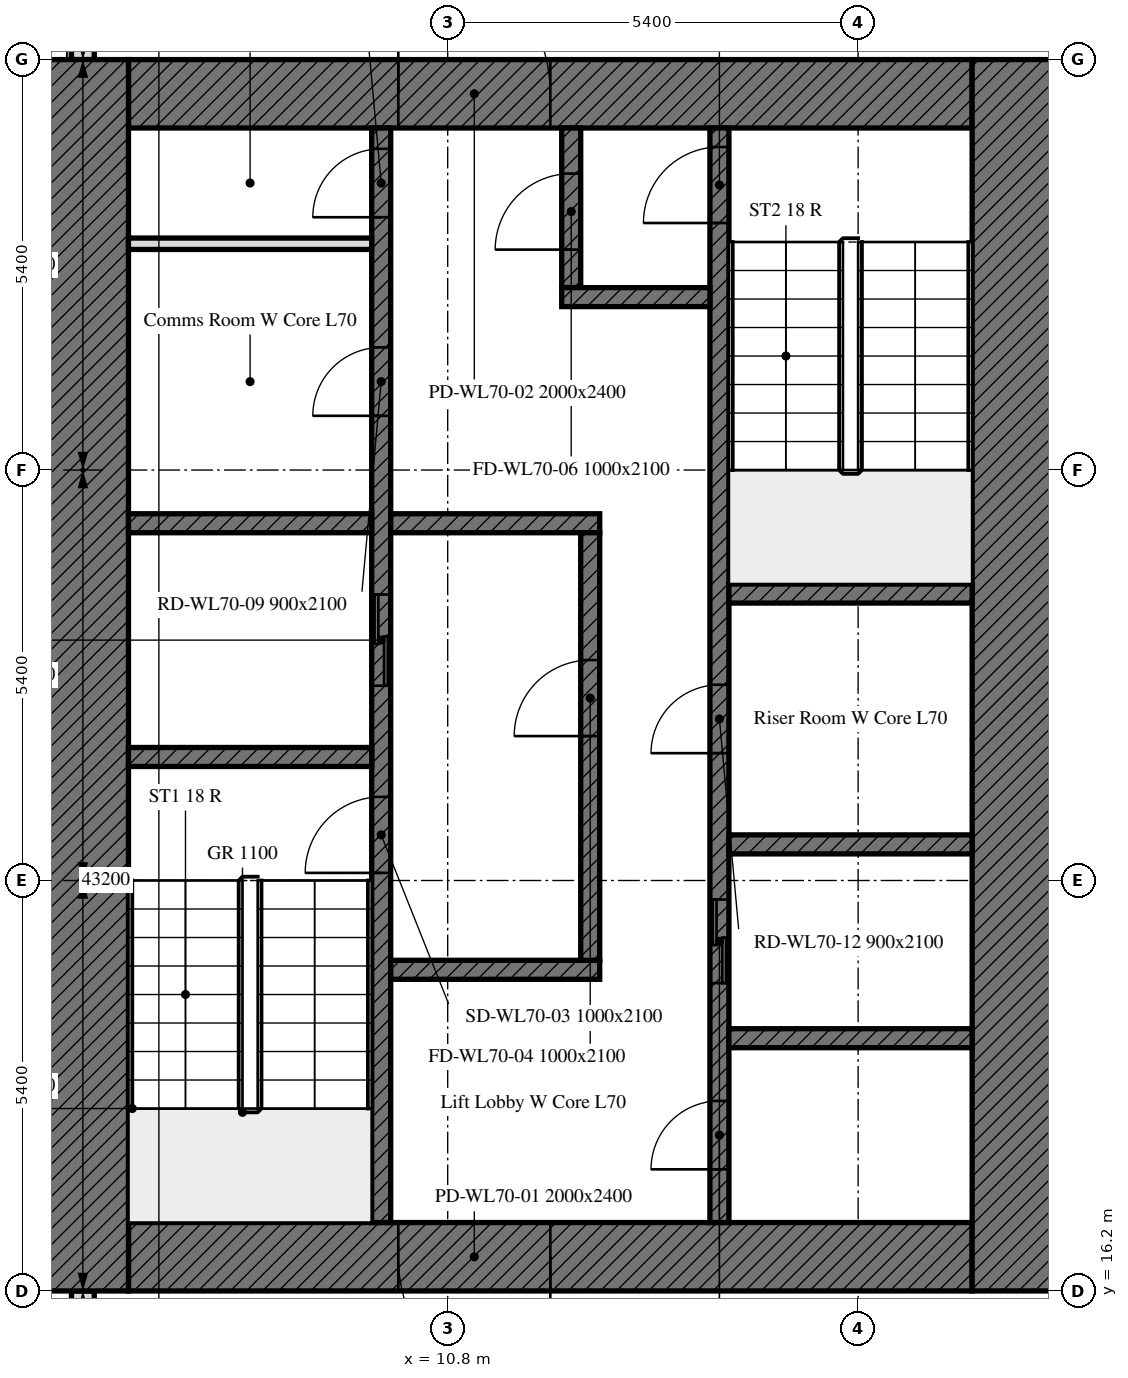
"""IFC4 building model, lengths in metres.
Left out: names, types, materials, properties, quantities, classifications, styles, units other than length and angle.
Written with IfcOpenShell. Run it as: python <this file> out.ifc"""

import sys

from ifc_helpers import new_model, si_unit, direction, frame, frame_2d, origin, place, context, subcontext, project, spatial, rectangle, extrude, element, fill, save


model = new_model("IFC4")
c1 = context("Model", 3, precision=1e-05, world=origin(), true_north=direction((0.0, 1.0)))
c2 = subcontext(c1, "Body", "Model", "MODEL_VIEW")
j1 = project(units=[si_unit("LENGTHUNIT", "METRE"), si_unit("PLANEANGLEUNIT", "RADIAN")], contexts=[c1])
p1 = place(None, origin())
s1 = spatial("IfcSite", under=j1, at=p1, CompositionType="ELEMENT")
p2 = place(p1, origin())
s2 = spatial("IfcBuilding", under=s1, at=p2, CompositionType="ELEMENT")
p3 = place(p2, frame((0.0, 0.0, 285.1)))
s3 = spatial("IfcBuildingStorey", under=s2, at=p3, CompositionType="ELEMENT", Elevation=285.1)
p4 = place(p3, frame((6.0, 37.614, 0.0), z_axis=(0.0, 0.0, 1.0), x_axis=(0.0, -1.0, 0.0)))
e1 = element("IfcWall", 1, at=p4, inside=s3, PredefinedType="SOLIDWALL", context=c2, shape_type="SweptSolid", body=[
    extrude(rectangle(XDim=5.214, YDim=0.3, at=frame_2d((2.607, 0.0))), origin(), (0.0, 0.0, 1.0), 3.0),
])
p5 = place(p4, frame((1.164, 0.0, 0.9)))
e2 = element("IfcOpeningElement", 2, at=p5, cuts=e1, PredefinedType="OPENING", context=c2, shape_type="SweptSolid", body=[
    extrude(rectangle(XDim=1.1, YDim=1.7, at=frame_2d((0.55, 0.85))), frame((0.0, 0.16, 0.0), z_axis=(0.0, -1.0, 0.0), x_axis=(1.0, 0.0, 0.0)), (0.0, 0.0, 1.0), 0.32),
])
p6 = place(p4, frame((3.139, 0.0, 0.9)))
e3 = element("IfcOpeningElement", 3, at=p6, cuts=e1, PredefinedType="OPENING", context=c2, shape_type="SweptSolid", body=[
    extrude(rectangle(XDim=0.65, YDim=1.7, at=frame_2d((0.325, 0.85))), frame((0.0, 0.16, 0.0), z_axis=(0.0, -1.0, 0.0), x_axis=(1.0, 0.0, 0.0)), (0.0, 0.0, 1.0), 0.32),
])
p7 = place(p3, frame((6.0, 16.2, 0.0), z_axis=(0.0, 0.0, 1.0), x_axis=(0.0, -1.0, 0.0)))
e4 = element("IfcWall", 4, at=p7, inside=s3, PredefinedType="SOLIDWALL", context=c2, shape_type="SweptSolid", body=[
    extrude(rectangle(XDim=10.614, YDim=0.3, at=frame_2d((5.307, 0.0))), origin(), (0.0, 0.0, 1.0), 3.0),
])
p8 = place(p7, frame((1.0, 0.0, 0.9)))
e5 = element("IfcOpeningElement", 5, at=p8, cuts=e4, PredefinedType="OPENING", context=c2, shape_type="SweptSolid", body=[
    extrude(rectangle(XDim=1.1, YDim=1.7, at=frame_2d((0.55, 0.85))), frame((0.0, 0.16, 0.0), z_axis=(0.0, -1.0, 0.0), x_axis=(1.0, 0.0, 0.0)), (0.0, 0.0, 1.0), 0.32),
])
p9 = place(p7, frame((2.95, 0.0, 0.9)))
e6 = element("IfcOpeningElement", 6, at=p9, cuts=e4, PredefinedType="OPENING", context=c2, shape_type="SweptSolid", body=[
    extrude(rectangle(XDim=1.1, YDim=1.7, at=frame_2d((0.55, 0.85))), frame((0.0, 0.16, 0.0), z_axis=(0.0, -1.0, 0.0), x_axis=(1.0, 0.0, 0.0)), (0.0, 0.0, 1.0), 0.32),
])
p10 = place(p7, frame((6.75, 0.0, 0.9)))
e7 = element("IfcOpeningElement", 7, at=p10, cuts=e4, PredefinedType="OPENING", context=c2, shape_type="SweptSolid", body=[
    extrude(rectangle(XDim=1.1, YDim=1.7, at=frame_2d((0.55, 0.85))), frame((0.0, 0.16, 0.0), z_axis=(0.0, -1.0, 0.0), x_axis=(1.0, 0.0, 0.0)), (0.0, 0.0, 1.0), 0.32),
])
p11 = place(p7, frame((8.35, 0.0, 0.9)))
e8 = element("IfcOpeningElement", 8, at=p11, cuts=e4, PredefinedType="OPENING", context=c2, shape_type="SweptSolid", body=[
    extrude(rectangle(XDim=1.1, YDim=1.7, at=frame_2d((0.55, 0.85))), frame((0.0, 0.16, 0.0), z_axis=(0.0, -1.0, 0.0), x_axis=(1.0, 0.0, 0.0)), (0.0, 0.0, 1.0), 0.32),
])
p12 = place(p3, frame((17.7, 16.65, 0.0), z_axis=(0.0, 0.0, 1.0), x_axis=(-1.0, 0.0, 0.0)))
e9 = element("IfcWall", 9, at=p12, inside=s3, PredefinedType="SOLIDWALL", context=c2, shape_type="SweptSolid", body=[
    extrude(rectangle(XDim=11.1, YDim=0.9, at=frame_2d((5.55, 0.0))), origin(), (0.0, 0.0, 1.0), 3.0),
])
p13 = place(p12, frame((5.55, 0.0, 0.0)))
e10 = element("IfcOpeningElement", 10, at=p13, cuts=e9, PredefinedType="OPENING", context=c2, shape_type="SweptSolid", body=[
    extrude(rectangle(XDim=2.0, YDim=2.4, at=frame_2d((1.0, 1.2))), frame((0.0, 0.45, 0.0), z_axis=(0.0, -1.0, 0.0), x_axis=(1.0, 0.0, 0.0)), (0.0, 0.0, 1.0), 0.9),
])
p14 = place(p3, frame((6.6, 31.95, 0.0), z_axis=(0.0, 0.0, 1.0), x_axis=(1.0, 0.0, 0.0)))
e11 = element("IfcWall", 11, at=p14, inside=s3, PredefinedType="SOLIDWALL", context=c2, shape_type="SweptSolid", body=[
    extrude(rectangle(XDim=11.1, YDim=0.9, at=frame_2d((5.55, 0.0))), origin(), (0.0, 0.0, 1.0), 3.0),
])
p15 = place(p14, frame((3.55, 0.0, 0.0)))
e12 = element("IfcOpeningElement", 12, at=p15, cuts=e11, PredefinedType="OPENING", context=c2, shape_type="SweptSolid", body=[
    extrude(rectangle(XDim=2.0, YDim=2.4, at=frame_2d((1.0, 1.2))), frame((0.0, 0.45, 0.0), z_axis=(0.0, -1.0, 0.0), x_axis=(1.0, 0.0, 0.0)), (0.0, 0.0, 1.0), 0.9),
])
for number, where, z_axis, x_axis in (
    (13, (6.0, 16.2, 0.0), (0.0, 0.0, 1.0), (0.0, 1.0, 0.0)),
    (14, (18.3, 32.4, 0.0), (0.0, 0.0, 1.0), (0.0, -1.0, 0.0)),
):
    element("IfcWall", number, at=place(p3, frame(where, z_axis=z_axis, x_axis=x_axis)), inside=s3, PredefinedType="SOLIDWALL", context=c2, shape_type="SweptSolid", body=[
        extrude(rectangle(XDim=16.2, YDim=1.2, at=frame_2d((8.1, 0.0))), origin(), (0.0, 0.0, 1.0), 3.0),
    ])
p16 = place(p3, frame((9.925, 17.1, 0.0), z_axis=(0.0, 0.0, 1.0), x_axis=(0.0, 1.0, 0.0)))
e15 = element("IfcWall", 15, at=p16, inside=s3, PredefinedType="SOLIDWALL", context=c2, shape_type="SweptSolid", body=[
    extrude(rectangle(XDim=14.4, YDim=0.25, at=frame_2d((7.2, 0.0))), origin(), (0.0, 0.0, 1.0), 3.0),
])
p17 = place(p16, frame((4.6, 0.0, 0.0)))
e16 = element("IfcOpeningElement", 16, at=p17, cuts=e15, PredefinedType="OPENING", context=c2, shape_type="SweptSolid", body=[
    extrude(rectangle(XDim=1.0, YDim=2.1, at=frame_2d((0.5, 1.05))), frame((0.0, 0.125, 0.0), z_axis=(0.0, -1.0, 0.0), x_axis=(1.0, 0.0, 0.0)), (0.0, 0.0, 1.0), 0.25),
])
p18 = place(p16, frame((7.062, 0.0, 0.0)))
e17 = element("IfcOpeningElement", 17, at=p18, cuts=e15, PredefinedType="OPENING", context=c2, shape_type="SweptSolid", body=[
    extrude(rectangle(XDim=1.2, YDim=2.1, at=frame_2d((0.6, 1.05))), frame((0.0, 0.125, 0.0), z_axis=(0.0, -1.0, 0.0), x_axis=(1.0, 0.0, 0.0)), (0.0, 0.0, 1.0), 0.25),
])
p19 = place(p16, frame((10.614, 0.0, 0.0)))
e18 = element("IfcOpeningElement", 18, at=p19, cuts=e15, PredefinedType="OPENING", context=c2, shape_type="SweptSolid", body=[
    extrude(rectangle(XDim=0.9, YDim=2.1, at=frame_2d((0.45, 1.05))), frame((0.0, 0.125, 0.0), z_axis=(0.0, -1.0, 0.0), x_axis=(1.0, 0.0, 0.0)), (0.0, 0.0, 1.0), 0.25),
])
p20 = place(p16, frame((13.226, 0.0, 0.0)))
e19 = element("IfcOpeningElement", 19, at=p20, cuts=e15, PredefinedType="OPENING", context=c2, shape_type="SweptSolid", body=[
    extrude(rectangle(XDim=0.9, YDim=2.1, at=frame_2d((0.45, 1.05))), frame((0.0, 0.125, 0.0), z_axis=(0.0, -1.0, 0.0), x_axis=(1.0, 0.0, 0.0)), (0.0, 0.0, 1.0), 0.25),
])
p21 = place(p3, frame((14.375, 17.1, 0.0), z_axis=(0.0, 0.0, 1.0), x_axis=(0.0, 1.0, 0.0)))
e20 = element("IfcWall", 20, at=p21, inside=s3, PredefinedType="SOLIDWALL", context=c2, shape_type="SweptSolid", body=[
    extrude(rectangle(XDim=14.4, YDim=0.25, at=frame_2d((7.2, 0.0))), origin(), (0.0, 0.0, 1.0), 3.0),
])
p22 = place(p21, frame((13.15, 0.0, 0.0)))
e21 = element("IfcOpeningElement", 21, at=p22, cuts=e20, PredefinedType="OPENING", context=c2, shape_type="SweptSolid", body=[
    extrude(rectangle(XDim=1.0, YDim=2.1, at=frame_2d((0.5, 1.05))), frame((0.0, 0.125, 0.0), z_axis=(0.0, -1.0, 0.0), x_axis=(1.0, 0.0, 0.0)), (0.0, 0.0, 1.0), 0.25),
])
p23 = place(p21, frame((3.15, 0.0, 0.0)))
e22 = element("IfcOpeningElement", 22, at=p23, cuts=e20, PredefinedType="OPENING", context=c2, shape_type="SweptSolid", body=[
    extrude(rectangle(XDim=1.1, YDim=2.1, at=frame_2d((0.55, 1.05))), frame((0.0, 0.125, 0.0), z_axis=(0.0, -1.0, 0.0), x_axis=(1.0, 0.0, 0.0)), (0.0, 0.0, 1.0), 0.25),
])
p24 = place(p21, frame((0.7, 0.0, 0.0)))
e23 = element("IfcOpeningElement", 23, at=p24, cuts=e20, PredefinedType="OPENING", context=c2, shape_type="SweptSolid", body=[
    extrude(rectangle(XDim=0.9, YDim=2.1, at=frame_2d((0.45, 1.05))), frame((0.0, 0.125, 0.0), z_axis=(0.0, -1.0, 0.0), x_axis=(1.0, 0.0, 0.0)), (0.0, 0.0, 1.0), 0.25),
])
p25 = place(p21, frame((6.175, 0.0, 0.0)))
e24 = element("IfcOpeningElement", 24, at=p25, cuts=e20, PredefinedType="OPENING", context=c2, shape_type="SweptSolid", body=[
    extrude(rectangle(XDim=0.9, YDim=2.1, at=frame_2d((0.45, 1.05))), frame((0.0, 0.125, 0.0), z_axis=(0.0, -1.0, 0.0), x_axis=(1.0, 0.0, 0.0)), (0.0, 0.0, 1.0), 0.25),
])
for number, where, z_axis, x_axis in (
    (25, (6.6, 23.225, 0.0), (0.0, 0.0, 1.0), (1.0, 0.0, 0.0)),
    (26, (14.5, 25.375, 0.0), (0.0, 0.0, 1.0), (1.0, 0.0, 0.0)),
    (27, (14.5, 22.075, 0.0), (0.0, 0.0, 1.0), (1.0, 0.0, 0.0)),
    (28, (6.6, 26.3, 0.0), (0.0, 0.0, 1.0), (1.0, 0.0, 0.0)),
):
    element("IfcWall", number, at=place(p3, frame(where, z_axis=z_axis, x_axis=x_axis)), inside=s3, PredefinedType="SOLIDWALL", context=c2, shape_type="SweptSolid", body=[
        extrude(rectangle(XDim=3.2, YDim=0.25, at=frame_2d((1.6, 0.0))), origin(), (0.0, 0.0, 1.0), 3.0),
    ])
for number, where, z_axis, x_axis in (
    (29, (10.05, 26.3, 0.0), (0.0, 0.0, 1.0), (1.0, 0.0, 0.0)),
    (30, (10.05, 20.425, 0.0), (0.0, 0.0, 1.0), (1.0, 0.0, 0.0)),
):
    element("IfcWall", number, at=place(p3, frame(where, z_axis=z_axis, x_axis=x_axis)), inside=s3, PredefinedType="SOLIDWALL", context=c2, shape_type="SweptSolid", body=[
        extrude(rectangle(XDim=2.75, YDim=0.25, at=frame_2d((1.375, 0.0))), origin(), (0.0, 0.0, 1.0), 3.0),
    ])
p26 = place(p3, frame((12.425, 29.4, 0.0), z_axis=(0.0, 0.0, 1.0), x_axis=(0.0, 1.0, 0.0)))
e31 = element("IfcWall", 31, at=p26, inside=s3, PredefinedType="SOLIDWALL", context=c2, shape_type="SweptSolid", body=[
    extrude(rectangle(XDim=2.1, YDim=0.25, at=frame_2d((1.05, 0.0))), origin(), (0.0, 0.0, 1.0), 3.0),
])
p27 = place(p26, frame((0.5, 0.0, 0.0)))
e32 = element("IfcOpeningElement", 32, at=p27, cuts=e31, PredefinedType="OPENING", context=c2, shape_type="SweptSolid", body=[
    extrude(rectangle(XDim=1.0, YDim=2.1, at=frame_2d((0.5, 1.05))), frame((0.0, 0.125, 0.0), z_axis=(0.0, -1.0, 0.0), x_axis=(1.0, 0.0, 0.0)), (0.0, 0.0, 1.0), 0.25),
])
p28 = place(p3, frame((12.3, 29.275, 0.0), z_axis=(0.0, 0.0, 1.0), x_axis=(1.0, 0.0, 0.0)))
e33 = element("IfcWall", 33, at=p28, inside=s3, PredefinedType="SOLIDWALL", context=c2, shape_type="SweptSolid", body=[
    extrude(rectangle(XDim=1.95, YDim=0.25, at=frame_2d((0.975, 0.0))), origin(), (0.0, 0.0, 1.0), 3.0),
])
p29 = place(p3, frame((12.675, 20.55, 0.0), z_axis=(0.0, 0.0, 1.0), x_axis=(0.0, 1.0, 0.0)))
e34 = element("IfcWall", 34, at=p29, inside=s3, PredefinedType="SOLIDWALL", context=c2, shape_type="SweptSolid", body=[
    extrude(rectangle(XDim=5.625, YDim=0.25, at=frame_2d((2.812, 0.0))), origin(), (0.0, 0.0, 1.0), 3.0),
])
p30 = place(p29, frame((2.95, 0.0, 0.0)))
e35 = element("IfcOpeningElement", 35, at=p30, cuts=e34, PredefinedType="OPENING", context=c2, shape_type="SweptSolid", body=[
    extrude(rectangle(XDim=1.0, YDim=2.1, at=frame_2d((0.5, 1.05))), frame((0.0, 0.125, 0.0), z_axis=(0.0, -1.0, 0.0), x_axis=(1.0, 0.0, 0.0)), (0.0, 0.0, 1.0), 0.25),
])
p31 = place(p3, frame((14.5, 19.525, 0.0), z_axis=(0.0, 0.0, 1.0), x_axis=(1.0, 0.0, 0.0)))
e36 = element("IfcWall", 36, at=p31, inside=s3, PredefinedType="SOLIDWALL", context=c2, shape_type="SweptSolid", body=[
    extrude(rectangle(XDim=3.2, YDim=0.25, at=frame_2d((1.6, 0.0))), origin(), (0.0, 0.0, 1.0), 3.0),
])
p32 = place(p3, frame((6.6, 29.977, 0.0), z_axis=(0.0, 0.0, 1.0), x_axis=(1.0, 0.0, 0.0)))
e37 = element("IfcWall", 37, at=p32, inside=s3, PredefinedType="PARTITIONING", context=c2, shape_type="SweptSolid", body=[
    extrude(rectangle(XDim=3.2, YDim=0.15, at=frame_2d((1.6, 0.0))), origin(), (0.0, 0.0, 1.0), 3.0),
])
p33 = place(p13, origin())
e38 = element("IfcDoor", 38, at=p33, inside=s3, OperationType="DOUBLE_DOOR_SINGLE_SWING", PredefinedType="DOOR", context=c2, shape_type="SweptSolid", body=[
    extrude(rectangle(XDim=2.0, YDim=2.4, at=frame_2d((1.0, 1.2))), frame((0.0, 0.025, 0.0), z_axis=(0.0, -1.0, 0.0), x_axis=(1.0, 0.0, 0.0)), (0.0, 0.0, 1.0), 0.05),
])
fill(e10, e38)
p34 = place(p15, origin())
e39 = element("IfcDoor", 39, at=p34, inside=s3, OperationType="DOUBLE_DOOR_SINGLE_SWING", PredefinedType="DOOR", context=c2, shape_type="SweptSolid", body=[
    extrude(rectangle(XDim=2.0, YDim=2.4, at=frame_2d((1.0, 1.2))), frame((0.0, 0.025, 0.0), z_axis=(0.0, -1.0, 0.0), x_axis=(1.0, 0.0, 0.0)), (0.0, 0.0, 1.0), 0.05),
])
fill(e12, e39)
p35 = place(p17, origin())
e40 = element("IfcDoor", 40, at=p35, inside=s3, OperationType="SINGLE_SWING_LEFT", PredefinedType="DOOR", context=c2, shape_type="SweptSolid", body=[
    extrude(rectangle(XDim=1.0, YDim=2.1, at=frame_2d((0.5, 1.05))), frame((0.0, 0.025, 0.0), z_axis=(0.0, -1.0, 0.0), x_axis=(1.0, 0.0, 0.0)), (0.0, 0.0, 1.0), 0.05),
])
fill(e16, e40)
p36 = place(p30, origin())
e41 = element("IfcDoor", 41, at=p36, inside=s3, OperationType="SINGLE_SWING_LEFT", PredefinedType="DOOR", context=c2, shape_type="SweptSolid", body=[
    extrude(rectangle(XDim=1.0, YDim=2.1, at=frame_2d((0.5, 1.05))), frame((0.0, 0.025, 0.0), z_axis=(0.0, -1.0, 0.0), x_axis=(1.0, 0.0, 0.0)), (0.0, 0.0, 1.0), 0.05),
])
fill(e35, e41)
p37 = place(p22, origin())
e42 = element("IfcDoor", 42, at=p37, inside=s3, OperationType="SINGLE_SWING_LEFT", PredefinedType="DOOR", context=c2, shape_type="SweptSolid", body=[
    extrude(rectangle(XDim=1.0, YDim=2.1, at=frame_2d((0.5, 1.05))), frame((0.0, 0.025, 0.0), z_axis=(0.0, -1.0, 0.0), x_axis=(1.0, 0.0, 0.0)), (0.0, 0.0, 1.0), 0.05),
])
fill(e21, e42)
p38 = place(p27, origin())
e43 = element("IfcDoor", 43, at=p38, inside=s3, OperationType="SINGLE_SWING_LEFT", PredefinedType="DOOR", context=c2, shape_type="SweptSolid", body=[
    extrude(rectangle(XDim=1.0, YDim=2.1, at=frame_2d((0.5, 1.05))), frame((0.0, 0.025, 0.0), z_axis=(0.0, -1.0, 0.0), x_axis=(1.0, 0.0, 0.0)), (0.0, 0.0, 1.0), 0.05),
])
fill(e32, e43)
p39 = place(p18, origin())
e44 = element("IfcDoor", 44, at=p39, inside=s3, OperationType="DOUBLE_DOOR_SLIDING", PredefinedType="DOOR", context=c2, shape_type="SweptSolid", body=[
    extrude(rectangle(XDim=1.2, YDim=2.1, at=frame_2d((0.6, 1.05))), frame((0.0, 0.025, 0.0), z_axis=(0.0, -1.0, 0.0), x_axis=(1.0, 0.0, 0.0)), (0.0, 0.0, 1.0), 0.05),
])
fill(e17, e44)
p40 = place(p23, origin())
e45 = element("IfcDoor", 45, at=p40, inside=s3, OperationType="DOUBLE_DOOR_SLIDING", PredefinedType="DOOR", context=c2, shape_type="SweptSolid", body=[
    extrude(rectangle(XDim=1.1, YDim=2.1, at=frame_2d((0.55, 1.05))), frame((0.0, 0.025, 0.0), z_axis=(0.0, -1.0, 0.0), x_axis=(1.0, 0.0, 0.0)), (0.0, 0.0, 1.0), 0.05),
])
fill(e22, e45)
p41 = place(p19, origin())
e46 = element("IfcDoor", 46, at=p41, inside=s3, OperationType="SINGLE_SWING_LEFT", PredefinedType="DOOR", context=c2, shape_type="SweptSolid", body=[
    extrude(rectangle(XDim=0.9, YDim=2.1, at=frame_2d((0.45, 1.05))), frame((0.0, 0.025, 0.0), z_axis=(0.0, -1.0, 0.0), x_axis=(1.0, 0.0, 0.0)), (0.0, 0.0, 1.0), 0.05),
])
fill(e18, e46)
p42 = place(p20, origin())
e47 = element("IfcDoor", 47, at=p42, inside=s3, OperationType="SINGLE_SWING_LEFT", PredefinedType="DOOR", context=c2, shape_type="SweptSolid", body=[
    extrude(rectangle(XDim=0.9, YDim=2.1, at=frame_2d((0.45, 1.05))), frame((0.0, 0.025, 0.0), z_axis=(0.0, -1.0, 0.0), x_axis=(1.0, 0.0, 0.0)), (0.0, 0.0, 1.0), 0.05),
])
fill(e19, e47)
p43 = place(p24, origin())
e48 = element("IfcDoor", 48, at=p43, inside=s3, OperationType="SINGLE_SWING_LEFT", PredefinedType="DOOR", context=c2, shape_type="SweptSolid", body=[
    extrude(rectangle(XDim=0.9, YDim=2.1, at=frame_2d((0.45, 1.05))), frame((0.0, 0.025, 0.0), z_axis=(0.0, -1.0, 0.0), x_axis=(1.0, 0.0, 0.0)), (0.0, 0.0, 1.0), 0.05),
])
fill(e23, e48)
p44 = place(p25, origin())
e49 = element("IfcDoor", 49, at=p44, inside=s3, OperationType="SINGLE_SWING_LEFT", PredefinedType="DOOR", context=c2, shape_type="SweptSolid", body=[
    extrude(rectangle(XDim=0.9, YDim=2.1, at=frame_2d((0.45, 1.05))), frame((0.0, 0.025, 0.0), z_axis=(0.0, -1.0, 0.0), x_axis=(1.0, 0.0, 0.0)), (0.0, 0.0, 1.0), 0.05),
])
fill(e24, e49)
save(model, sys.argv[1])
